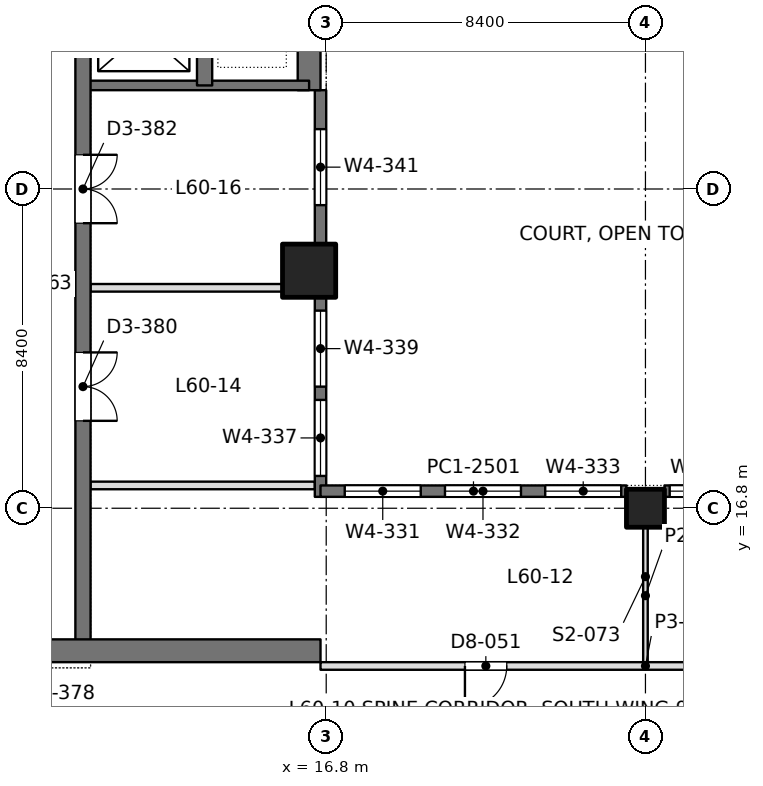
"""IFC4 building model, lengths in metres.
Left out: names, types, materials, properties, quantities, classifications, styles, units other than length and angle.
Written with IfcOpenShell. Run it as: python <this file> out.ifc"""

import sys

from ifc_helpers import new_model, si_unit, direction, frame, frame_2d, origin, origin_2d, place, context, subcontext, project, spatial, rectangle, extrude, element, fill, save


model = new_model("IFC4")
c1 = context("Model", 3, precision=1e-05, world=origin(), true_north=direction((0.0, 1.0)))
c2 = subcontext(c1, "Body", "Model", "MODEL_VIEW")
j1 = project(units=[si_unit("LENGTHUNIT", "METRE"), si_unit("PLANEANGLEUNIT", "RADIAN")], contexts=[c1])
p1 = place(None, origin())
s1 = spatial("IfcSite", under=j1, at=p1, CompositionType="ELEMENT")
p2 = place(p1, origin())
s2 = spatial("IfcBuilding", under=s1, at=p2, CompositionType="ELEMENT")
p3 = place(p2, frame((0.0, 0.0, 263.7)))
s3 = spatial("IfcBuildingStorey", under=s2, at=p3, CompositionType="ELEMENT", Elevation=263.7)
p4 = place(p3, frame((25.2, 16.8, 0.0), z_axis=(0.0, 0.0, 1.0), x_axis=(1.0, 0.0, 0.0)))
e1 = element("IfcColumn", 1, at=p4, inside=s3, PredefinedType="COLUMN", context=c2, shape_type="SweptSolid", body=[
    extrude(rectangle(XDim=1.0, YDim=1.0, at=origin_2d()), origin(), (0.0, 0.0, 1.0), 4.5),
])
p5 = place(p3, frame((16.35, 23.05, 0.0), z_axis=(0.0, 0.0, 1.0), x_axis=(1.0, 0.0, 0.0)))
e2 = element("IfcColumn", 2, at=p5, inside=s3, PredefinedType="COLUMN", context=c2, shape_type="SweptSolid", body=[
    extrude(rectangle(XDim=1.4, YDim=1.4, at=origin_2d()), origin(), (0.0, 0.0, 1.0), 4.5),
])
p6 = place(p3, frame((-1.05, 13.05, 0.0), z_axis=(0.0, 0.0, 1.0), x_axis=(1.0, 0.0, 0.0)))
e3 = element("IfcWall", 3, at=p6, inside=s3, PredefinedType="SHEAR", context=c2, shape_type="SweptSolid", body=[
    extrude(rectangle(XDim=17.7, YDim=0.6, at=frame_2d((8.85, 0.0))), origin(), (0.0, 0.0, 1.0), 4.5),
])
p7 = place(p6, frame((8.8, 0.0, 0.0)))
e4 = element("IfcOpeningElement", 4, at=p7, cuts=e3, PredefinedType="OPENING", context=c2, shape_type="SweptSolid", body=[
    extrude(rectangle(XDim=1.8, YDim=2.4, at=frame_2d((0.9, 1.2))), frame((0.0, 0.31, 0.0), z_axis=(0.0, -1.0, 0.0), x_axis=(1.0, 0.0, 0.0)), (0.0, 0.0, 1.0), 0.62),
])
p8 = place(p3, frame((16.35, 27.8, 0.0), z_axis=(0.0, 0.0, 1.0), x_axis=(0.0, 1.0, 0.0)))
e5 = element("IfcWall", 5, at=p8, inside=s3, PredefinedType="SHEAR", context=c2, shape_type="SweptSolid", body=[
    extrude(rectangle(XDim=9.55, YDim=0.6, at=frame_2d((4.775, 0.0))), origin(), (0.0, 0.0, 1.0), 4.5),
])
p9 = place(p3, frame((10.4, 13.05, 0.0), z_axis=(0.0, 0.0, 1.0), x_axis=(0.0, 1.0, 0.0)))
e6 = element("IfcWall", 6, at=p9, inside=s3, PredefinedType="SHEAR", context=c2, shape_type="SweptSolid", body=[
    extrude(rectangle(XDim=24.3, YDim=0.4, at=frame_2d((12.15, 0.0))), origin(), (0.0, 0.0, 1.0), 4.5),
])
p10 = place(p9, frame((15.75, 0.0, 0.0)))
e7 = element("IfcOpeningElement", 7, at=p10, cuts=e6, PredefinedType="OPENING", context=c2, shape_type="SweptSolid", body=[
    extrude(rectangle(XDim=1.1, YDim=2.2, at=frame_2d((0.55, 1.1))), frame((0.0, 0.21, 0.0), z_axis=(0.0, -1.0, 0.0), x_axis=(1.0, 0.0, 0.0)), (0.0, 0.0, 1.0), 0.42),
])
p11 = place(p9, frame((18.6, 0.0, 0.0)))
e8 = element("IfcOpeningElement", 8, at=p11, cuts=e6, PredefinedType="OPENING", context=c2, shape_type="SweptSolid", body=[
    extrude(rectangle(XDim=1.1, YDim=2.2, at=frame_2d((0.55, 1.1))), frame((0.0, 0.21, 0.0), z_axis=(0.0, -1.0, 0.0), x_axis=(1.0, 0.0, 0.0)), (0.0, 0.0, 1.0), 0.42),
])
p12 = place(p9, frame((21.45, 0.0, 0.0)))
e9 = element("IfcOpeningElement", 9, at=p12, cuts=e6, PredefinedType="OPENING", context=c2, shape_type="SweptSolid", body=[
    extrude(rectangle(XDim=1.1, YDim=2.2, at=frame_2d((0.55, 1.1))), frame((0.0, 0.21, 0.0), z_axis=(0.0, -1.0, 0.0), x_axis=(1.0, 0.0, 0.0)), (0.0, 0.0, 1.0), 0.42),
])
p13 = place(p9, frame((6.05, 0.0, 0.0)))
e10 = element("IfcOpeningElement", 10, at=p13, cuts=e6, PredefinedType="OPENING", context=c2, shape_type="SweptSolid", body=[
    extrude(rectangle(XDim=1.8, YDim=2.4, at=frame_2d((0.9, 1.2))), frame((0.0, 0.21, 0.0), z_axis=(0.0, -1.0, 0.0), x_axis=(1.0, 0.0, 0.0)), (0.0, 0.0, 1.0), 0.42),
])
p14 = place(p9, frame((11.25, 0.0, 0.0)))
e11 = element("IfcOpeningElement", 11, at=p14, cuts=e6, PredefinedType="OPENING", context=c2, shape_type="SweptSolid", body=[
    extrude(rectangle(XDim=1.8, YDim=2.4, at=frame_2d((0.9, 1.2))), frame((0.0, 0.21, 0.0), z_axis=(0.0, -1.0, 0.0), x_axis=(1.0, 0.0, 0.0)), (0.0, 0.0, 1.0), 0.42),
])
p15 = place(p3, frame((13.6, 27.925, 0.0), z_axis=(0.0, 0.0, 1.0), x_axis=(0.0, 1.0, 0.0)))
e12 = element("IfcWall", 12, at=p15, inside=s3, PredefinedType="SHEAR", context=c2, shape_type="SweptSolid", body=[
    extrude(rectangle(XDim=9.425, YDim=0.4, at=frame_2d((4.712, 0.0))), origin(), (0.0, 0.0, 1.0), 4.5),
])
p16 = place(p3, frame((10.4, 27.925, 0.0), z_axis=(0.0, 0.0, 1.0), x_axis=(1.0, 0.0, 0.0)))
e13 = element("IfcWall", 13, at=p16, inside=s3, PredefinedType="SHEAR", context=c2, shape_type="SweptSolid", body=[
    extrude(rectangle(XDim=5.95, YDim=0.25, at=frame_2d((2.975, 0.0))), origin(), (0.0, 0.0, 1.0), 4.5),
])
p17 = place(p3, frame((16.65, 17.1, 0.0), z_axis=(0.0, 0.0, 1.0), x_axis=(0.0, 1.0, 0.0)))
e14 = element("IfcWall", 14, at=p17, inside=s3, PredefinedType="SOLIDWALL", context=c2, shape_type="SweptSolid", body=[
    extrude(rectangle(XDim=10.7, YDim=0.3, at=frame_2d((5.35, 0.0))), origin(), (0.0, 0.0, 1.0), 4.35),
])
p18 = place(p17, frame((0.55, 0.0, 0.9)))
e15 = element("IfcOpeningElement", 15, at=p18, cuts=e14, PredefinedType="OPENING", context=c2, shape_type="SweptSolid", body=[
    extrude(rectangle(XDim=2.0, YDim=1.9, at=frame_2d((1.0, 0.95))), frame((0.0, 0.16, 0.0), z_axis=(0.0, -1.0, 0.0), x_axis=(1.0, 0.0, 0.0)), (0.0, 0.0, 1.0), 0.32),
])
p19 = place(p17, frame((2.9, 0.0, 0.9)))
e16 = element("IfcOpeningElement", 16, at=p19, cuts=e14, PredefinedType="OPENING", context=c2, shape_type="SweptSolid", body=[
    extrude(rectangle(XDim=2.0, YDim=1.9, at=frame_2d((1.0, 0.95))), frame((0.0, 0.16, 0.0), z_axis=(0.0, -1.0, 0.0), x_axis=(1.0, 0.0, 0.0)), (0.0, 0.0, 1.0), 0.32),
])
p20 = place(p17, frame((7.675, 0.0, 0.9)))
e17 = element("IfcOpeningElement", 17, at=p20, cuts=e14, PredefinedType="OPENING", context=c2, shape_type="SweptSolid", body=[
    extrude(rectangle(XDim=2.0, YDim=1.9, at=frame_2d((1.0, 0.95))), frame((0.0, 0.16, 0.0), z_axis=(0.0, -1.0, 0.0), x_axis=(1.0, 0.0, 0.0)), (0.0, 0.0, 1.0), 0.32),
])
p21 = place(p3, frame((16.65, 17.25, 0.0), z_axis=(0.0, 0.0, 1.0), x_axis=(1.0, 0.0, 0.0)))
e18 = element("IfcWall", 18, at=p21, inside=s3, PredefinedType="SOLIDWALL", context=c2, shape_type="SweptSolid", body=[
    extrude(rectangle(XDim=8.05, YDim=0.3, at=frame_2d((4.025, 0.0))), origin(), (0.0, 0.0, 1.0), 4.35),
])
p22 = place(p21, frame((0.637, 0.0, 0.9)))
e19 = element("IfcOpeningElement", 19, at=p22, cuts=e18, PredefinedType="OPENING", context=c2, shape_type="SweptSolid", body=[
    extrude(rectangle(XDim=2.0, YDim=1.9, at=frame_2d((1.0, 0.95))), frame((0.0, 0.16, 0.0), z_axis=(0.0, -1.0, 0.0), x_axis=(1.0, 0.0, 0.0)), (0.0, 0.0, 1.0), 0.32),
])
p23 = place(p21, frame((3.275, 0.0, 0.9)))
e20 = element("IfcOpeningElement", 20, at=p23, cuts=e18, PredefinedType="OPENING", context=c2, shape_type="SweptSolid", body=[
    extrude(rectangle(XDim=2.0, YDim=1.9, at=frame_2d((1.0, 0.95))), frame((0.0, 0.16, 0.0), z_axis=(0.0, -1.0, 0.0), x_axis=(1.0, 0.0, 0.0)), (0.0, 0.0, 1.0), 0.32),
])
p24 = place(p21, frame((5.913, 0.0, 0.9)))
e21 = element("IfcOpeningElement", 21, at=p24, cuts=e18, PredefinedType="OPENING", context=c2, shape_type="SweptSolid", body=[
    extrude(rectangle(XDim=2.0, YDim=1.9, at=frame_2d((1.0, 0.95))), frame((0.0, 0.16, 0.0), z_axis=(0.0, -1.0, 0.0), x_axis=(1.0, 0.0, 0.0)), (0.0, 0.0, 1.0), 0.32),
])
p25 = place(p3, frame((25.7, 17.25, 0.0), z_axis=(0.0, 0.0, 1.0), x_axis=(1.0, 0.0, 0.0)))
e22 = element("IfcWall", 22, at=p25, inside=s3, PredefinedType="SOLIDWALL", context=c2, shape_type="SweptSolid", body=[
    extrude(rectangle(XDim=8.05, YDim=0.3, at=frame_2d((4.025, 0.0))), origin(), (0.0, 0.0, 1.0), 4.35),
])
p26 = place(p25, frame((0.137, 0.0, 0.9)))
e23 = element("IfcOpeningElement", 23, at=p26, cuts=e22, PredefinedType="OPENING", context=c2, shape_type="SweptSolid", body=[
    extrude(rectangle(XDim=2.0, YDim=1.9, at=frame_2d((1.0, 0.95))), frame((0.0, 0.16, 0.0), z_axis=(0.0, -1.0, 0.0), x_axis=(1.0, 0.0, 0.0)), (0.0, 0.0, 1.0), 0.32),
])
p27 = place(p25, frame((2.775, 0.0, 0.9)))
e24 = element("IfcOpeningElement", 24, at=p27, cuts=e22, PredefinedType="OPENING", context=c2, shape_type="SweptSolid", body=[
    extrude(rectangle(XDim=2.0, YDim=1.9, at=frame_2d((1.0, 0.95))), frame((0.0, 0.16, 0.0), z_axis=(0.0, -1.0, 0.0), x_axis=(1.0, 0.0, 0.0)), (0.0, 0.0, 1.0), 0.32),
])
p28 = place(p25, frame((5.413, 0.0, 0.9)))
e25 = element("IfcOpeningElement", 25, at=p28, cuts=e22, PredefinedType="OPENING", context=c2, shape_type="SweptSolid", body=[
    extrude(rectangle(XDim=2.0, YDim=1.9, at=frame_2d((1.0, 0.95))), frame((0.0, 0.16, 0.0), z_axis=(0.0, -1.0, 0.0), x_axis=(1.0, 0.0, 0.0)), (0.0, 0.0, 1.0), 0.32),
])
p29 = place(p3, frame((10.598, 17.4, 0.0), z_axis=(0.0, 0.0, 1.0), x_axis=(1.0, 0.0, 0.0)))
e26 = element("IfcWall", 26, at=p29, inside=s3, PredefinedType="PARTITIONING", context=c2, shape_type="SweptSolid", body=[
    extrude(rectangle(XDim=5.904, YDim=0.2, at=frame_2d((2.952, 0.0))), origin(), (0.0, 0.0, 1.0), 3.8),
])
p30 = place(p3, frame((10.598, 22.6, 0.0), z_axis=(0.0, 0.0, 1.0), x_axis=(1.0, 0.0, 0.0)))
e27 = element("IfcWall", 27, at=p30, inside=s3, PredefinedType="PARTITIONING", context=c2, shape_type="SweptSolid", body=[
    extrude(rectangle(XDim=5.053, YDim=0.2, at=frame_2d((2.526, 0.0))), origin(), (0.0, 0.0, 1.0), 4.35),
])
p31 = place(p3, frame((25.2, 12.698, 0.0), z_axis=(0.0, 0.0, 1.0), x_axis=(0.0, 1.0, 0.0)))
e28 = element("IfcWall", 28, at=p31, inside=s3, PredefinedType="PARTITIONING", context=c2, shape_type="SweptSolid", body=[
    extrude(rectangle(XDim=3.603, YDim=0.12, at=frame_2d((1.802, 0.0))), origin(), (0.0, 0.0, 1.0), 3.8),
])
p32 = place(p3, frame((16.65, 12.65, 0.0), z_axis=(0.0, 0.0, 1.0), x_axis=(1.0, 0.0, 0.0)))
e29 = element("IfcWall", 29, at=p32, inside=s3, PredefinedType="PARTITIONING", context=c2, shape_type="SweptSolid", body=[
    extrude(rectangle(XDim=17.1, YDim=0.2, at=frame_2d((8.55, 0.0))), origin(), (0.0, 0.0, 1.0), 3.8),
])
p33 = place(p32, frame((3.8, 0.0, 0.0)))
e30 = element("IfcOpeningElement", 30, at=p33, cuts=e29, PredefinedType="OPENING", context=c2, shape_type="SweptSolid", body=[
    extrude(rectangle(XDim=1.1, YDim=2.4, at=frame_2d((0.55, 1.2))), frame((0.0, 0.11, 0.0), z_axis=(0.0, -1.0, 0.0), x_axis=(1.0, 0.0, 0.0)), (0.0, 0.0, 1.0), 0.22),
])
p34 = place(p32, frame((12.2, 0.0, 0.0)))
e31 = element("IfcOpeningElement", 31, at=p34, cuts=e29, PredefinedType="OPENING", context=c2, shape_type="SweptSolid", body=[
    extrude(rectangle(XDim=1.1, YDim=2.4, at=frame_2d((0.55, 1.2))), frame((0.0, 0.11, 0.0), z_axis=(0.0, -1.0, 0.0), x_axis=(1.0, 0.0, 0.0)), (0.0, 0.0, 1.0), 0.22),
])
p35 = place(p18, origin())
e32 = element("IfcWindow", 32, at=p35, inside=s3, PartitioningType="SINGLE_PANEL", PredefinedType="WINDOW", context=c2, shape_type="SweptSolid", body=[
    extrude(rectangle(XDim=2.0, YDim=1.9, at=frame_2d((1.0, 0.95))), frame((0.0, 0.03, 0.0), z_axis=(0.0, -1.0, 0.0), x_axis=(1.0, 0.0, 0.0)), (0.0, 0.0, 1.0), 0.06),
])
fill(e15, e32)
p36 = place(p19, origin())
e33 = element("IfcWindow", 33, at=p36, inside=s3, PartitioningType="SINGLE_PANEL", PredefinedType="WINDOW", context=c2, shape_type="SweptSolid", body=[
    extrude(rectangle(XDim=2.0, YDim=1.9, at=frame_2d((1.0, 0.95))), frame((0.0, 0.03, 0.0), z_axis=(0.0, -1.0, 0.0), x_axis=(1.0, 0.0, 0.0)), (0.0, 0.0, 1.0), 0.06),
])
fill(e16, e33)
p37 = place(p20, origin())
e34 = element("IfcWindow", 34, at=p37, inside=s3, PartitioningType="SINGLE_PANEL", PredefinedType="WINDOW", context=c2, shape_type="SweptSolid", body=[
    extrude(rectangle(XDim=2.0, YDim=1.9, at=frame_2d((1.0, 0.95))), frame((0.0, 0.03, 0.0), z_axis=(0.0, -1.0, 0.0), x_axis=(1.0, 0.0, 0.0)), (0.0, 0.0, 1.0), 0.06),
])
fill(e17, e34)
p38 = place(p22, origin())
e35 = element("IfcWindow", 35, at=p38, inside=s3, PartitioningType="SINGLE_PANEL", PredefinedType="WINDOW", context=c2, shape_type="SweptSolid", body=[
    extrude(rectangle(XDim=2.0, YDim=1.9, at=frame_2d((1.0, 0.95))), frame((0.0, 0.03, 0.0), z_axis=(0.0, -1.0, 0.0), x_axis=(1.0, 0.0, 0.0)), (0.0, 0.0, 1.0), 0.06),
])
fill(e19, e35)
p39 = place(p23, origin())
e36 = element("IfcWindow", 36, at=p39, inside=s3, PartitioningType="SINGLE_PANEL", PredefinedType="WINDOW", context=c2, shape_type="SweptSolid", body=[
    extrude(rectangle(XDim=2.0, YDim=1.9, at=frame_2d((1.0, 0.95))), frame((0.0, 0.03, 0.0), z_axis=(0.0, -1.0, 0.0), x_axis=(1.0, 0.0, 0.0)), (0.0, 0.0, 1.0), 0.06),
])
fill(e20, e36)
p40 = place(p24, origin())
e37 = element("IfcWindow", 37, at=p40, inside=s3, PartitioningType="SINGLE_PANEL", PredefinedType="WINDOW", context=c2, shape_type="SweptSolid", body=[
    extrude(rectangle(XDim=2.0, YDim=1.9, at=frame_2d((1.0, 0.95))), frame((0.0, 0.03, 0.0), z_axis=(0.0, -1.0, 0.0), x_axis=(1.0, 0.0, 0.0)), (0.0, 0.0, 1.0), 0.06),
])
fill(e21, e37)
p41 = place(p26, origin())
e38 = element("IfcWindow", 38, at=p41, inside=s3, PartitioningType="SINGLE_PANEL", PredefinedType="WINDOW", context=c2, shape_type="SweptSolid", body=[
    extrude(rectangle(XDim=2.0, YDim=1.9, at=frame_2d((1.0, 0.95))), frame((0.0, 0.03, 0.0), z_axis=(0.0, -1.0, 0.0), x_axis=(1.0, 0.0, 0.0)), (0.0, 0.0, 1.0), 0.06),
])
fill(e23, e38)
p42 = place(p13, frame((1.8, 0.0, 0.0), z_axis=(0.0, 0.0, 1.0), x_axis=(-1.0, 0.0, 0.0)))
e39 = element("IfcDoor", 39, at=p42, inside=s3, OperationType="DOUBLE_DOOR_SINGLE_SWING", PredefinedType="DOOR", context=c2, shape_type="SweptSolid", body=[
    extrude(rectangle(XDim=1.8, YDim=2.4, at=frame_2d((0.9, 1.2))), frame((0.0, 0.025, 0.0), z_axis=(0.0, -1.0, 0.0), x_axis=(1.0, 0.0, 0.0)), (0.0, 0.0, 1.0), 0.05),
])
fill(e10, e39)
p43 = place(p14, frame((1.8, 0.0, 0.0), z_axis=(0.0, 0.0, 1.0), x_axis=(-1.0, 0.0, 0.0)))
e40 = element("IfcDoor", 40, at=p43, inside=s3, OperationType="DOUBLE_DOOR_SINGLE_SWING", PredefinedType="DOOR", context=c2, shape_type="SweptSolid", body=[
    extrude(rectangle(XDim=1.8, YDim=2.4, at=frame_2d((0.9, 1.2))), frame((0.0, 0.025, 0.0), z_axis=(0.0, -1.0, 0.0), x_axis=(1.0, 0.0, 0.0)), (0.0, 0.0, 1.0), 0.05),
])
fill(e11, e40)
p44 = place(p33, frame((1.1, 0.0, 0.0), z_axis=(0.0, 0.0, 1.0), x_axis=(-1.0, 0.0, 0.0)))
e41 = element("IfcDoor", 41, at=p44, inside=s3, OperationType="SINGLE_SWING_RIGHT", PredefinedType="DOOR", context=c2, shape_type="SweptSolid", body=[
    extrude(rectangle(XDim=1.1, YDim=2.4, at=frame_2d((0.55, 1.2))), frame((0.0, 0.025, 0.0), z_axis=(0.0, -1.0, 0.0), x_axis=(1.0, 0.0, 0.0)), (0.0, 0.0, 1.0), 0.05),
])
fill(e30, e41)
save(model, sys.argv[1])
